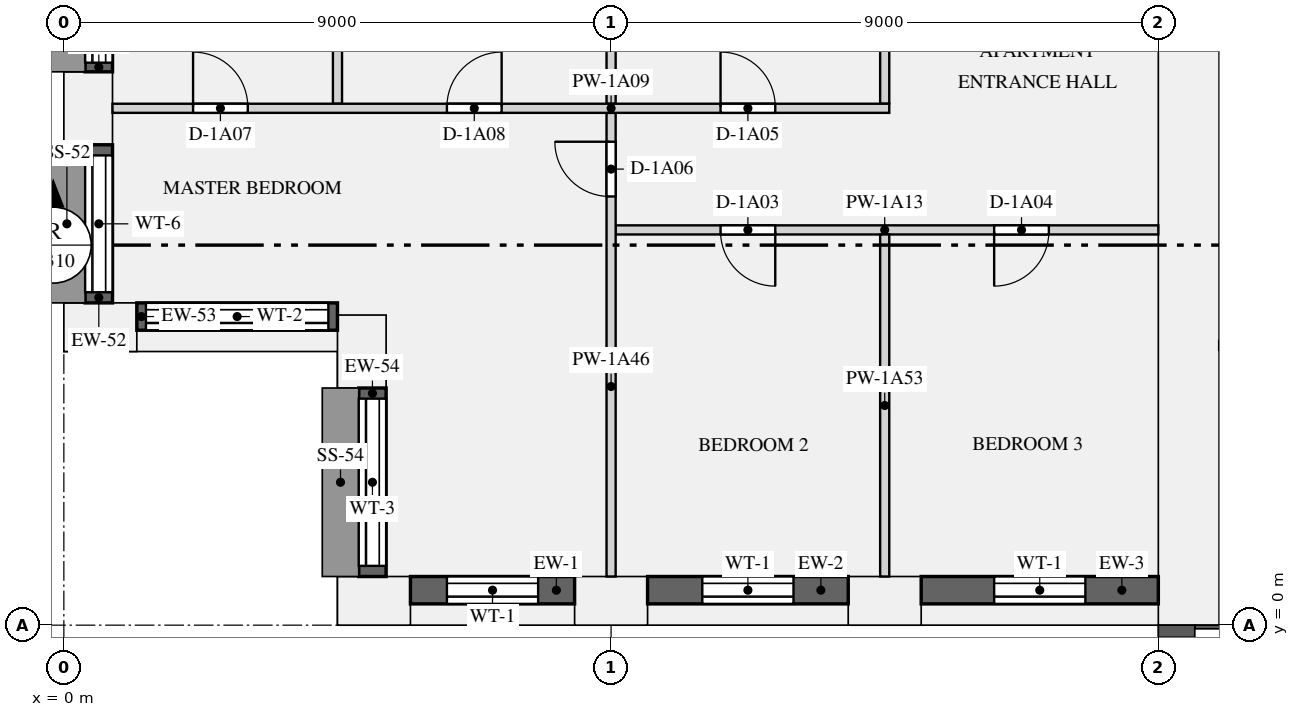
"""IFC4 building model, lengths in metres.
Left out: names, types, materials, properties, quantities, classifications, styles, units other than length and angle.
Written with IfcOpenShell. Run it as: python <this file> out.ifc"""

import sys

from ifc_helpers import new_model, si_unit, direction, frame, frame_2d, origin, origin_2d, place, context, subcontext, project, spatial, rectangle, extrude, element, fill, save


model = new_model("IFC4")
c1 = context("Model", 3, precision=1e-05, world=origin(), true_north=direction((0.0, 1.0)))
c2 = subcontext(c1, "Body", "Model", "MODEL_VIEW")
j1 = project(units=[si_unit("LENGTHUNIT", "METRE"), si_unit("PLANEANGLEUNIT", "RADIAN")], contexts=[c1])
p1 = place(None, origin())
s1 = spatial("IfcSite", under=j1, at=p1, CompositionType="ELEMENT")
p2 = place(p1, origin())
s2 = spatial("IfcBuilding", under=s1, at=p2, CompositionType="ELEMENT")
p3 = place(p2, frame((0.0, 0.0, 19.5)))
s3 = spatial("IfcBuildingStorey", under=s2, at=p3, CompositionType="ELEMENT", Elevation=19.5)
for number, where, z_axis, x_axis in (
    (1, (5.1, 0.4, 0.0), (0.0, 0.0, 1.0), (1.0, 0.0, 0.0)),
    (2, (9.0, 0.4, 0.0), (0.0, 0.0, 1.0), (1.0, 0.0, 0.0)),
):
    element("IfcColumn", number, at=place(p3, frame(where, z_axis=z_axis, x_axis=x_axis)), inside=s3, PredefinedType="USERDEFINED", context=c2, shape_type="SweptSolid", body=[
        extrude(rectangle(XDim=1.2, YDim=0.8, at=origin_2d()), origin(), (0.0, 0.0, 1.0), 3.15),
    ])
for number, where, z_axis, x_axis in (
    (3, (13.5, 0.4, -0.32), (0.0, 0.0, 1.0), (1.0, 0.0, 0.0)),
    (4, (0.4, 8.5, -0.32), (0.0, 0.0, 1.0), (0.0, -1.0, 0.0)),
):
    element("IfcColumn", number, at=place(p3, frame(where, z_axis=z_axis, x_axis=x_axis)), inside=s3, PredefinedType="USERDEFINED", context=c2, shape_type="SweptSolid", body=[
        extrude(rectangle(XDim=1.2, YDim=0.8, at=origin_2d()), origin(), (0.0, 0.0, 1.0), 3.47),
    ])
for number, where, z_axis, x_axis in (
    (5, (0.6, 4.9, 0.0), (0.0, 0.0, 1.0), (1.0, 0.0, 0.0)),
    (6, (4.9, 4.5, 0.0), (0.0, 0.0, 1.0), (0.0, -1.0, 0.0)),
):
    element("IfcColumn", number, at=place(p3, frame(where, z_axis=z_axis, x_axis=x_axis)), inside=s3, PredefinedType="USERDEFINED", context=c2, shape_type="SweptSolid", body=[
        extrude(rectangle(XDim=1.2, YDim=0.8, at=origin_2d()), origin(), (0.0, 0.0, 1.0), 3.15),
    ])
p4 = place(p3, frame((18.5, 0.0, 0.0), z_axis=(0.0, 0.0, 1.0), x_axis=(0.0, 1.0, 0.0)))
e7 = element("IfcWall", 7, at=p4, inside=s3, PredefinedType="SHEAR", context=c2, shape_type="SweptSolid", body=[
    extrude(rectangle(XDim=12.5, YDim=1.0, at=frame_2d((6.25, 0.0))), origin(), (0.0, 0.0, 1.0), 3.15),
])
p5 = place(p3, frame((5.7, 0.575, 0.9), z_axis=(0.0, 0.0, 1.0), x_axis=(1.0, 0.0, 0.0)))
e8 = element("IfcWall", 8, at=p5, inside=s3, PredefinedType="SOLIDWALL", context=c2, shape_type="SweptSolid", body=[
    extrude(rectangle(XDim=2.7, YDim=0.45, at=frame_2d((1.35, 0.0))), origin(), (0.0, 0.0, 1.0), 1.93),
])
p6 = place(p5, frame((0.6, 0.0, 0.15)))
e9 = element("IfcOpeningElement", 9, at=p6, cuts=e8, PredefinedType="OPENING", context=c2, shape_type="SweptSolid", body=[
    extrude(rectangle(XDim=1.5, YDim=1.5, at=frame_2d((0.75, 0.75))), frame((0.0, 0.235, 0.0), z_axis=(0.0, -1.0, 0.0), x_axis=(1.0, 0.0, 0.0)), (0.0, 0.0, 1.0), 0.47),
])
p7 = place(p3, frame((9.6, 0.575, 0.9), z_axis=(0.0, 0.0, 1.0), x_axis=(1.0, 0.0, 0.0)))
e10 = element("IfcWall", 10, at=p7, inside=s3, PredefinedType="SOLIDWALL", context=c2, shape_type="SweptSolid", body=[
    extrude(rectangle(XDim=3.3, YDim=0.45, at=frame_2d((1.65, 0.0))), origin(), (0.0, 0.0, 1.0), 1.93),
])
p8 = place(p7, frame((0.9, 0.0, 0.15)))
e11 = element("IfcOpeningElement", 11, at=p8, cuts=e10, PredefinedType="OPENING", context=c2, shape_type="SweptSolid", body=[
    extrude(rectangle(XDim=1.5, YDim=1.5, at=frame_2d((0.75, 0.75))), frame((0.0, 0.235, 0.0), z_axis=(0.0, -1.0, 0.0), x_axis=(1.0, 0.0, 0.0)), (0.0, 0.0, 1.0), 0.47),
])
p9 = place(p3, frame((14.1, 0.575, 0.9), z_axis=(0.0, 0.0, 1.0), x_axis=(1.0, 0.0, 0.0)))
e12 = element("IfcWall", 12, at=p9, inside=s3, PredefinedType="SOLIDWALL", context=c2, shape_type="SweptSolid", body=[
    extrude(rectangle(XDim=3.9, YDim=0.45, at=frame_2d((1.95, 0.0))), origin(), (0.0, 0.0, 1.0), 1.93),
])
p10 = place(p9, frame((1.2, 0.0, 0.15)))
e13 = element("IfcOpeningElement", 13, at=p10, cuts=e12, PredefinedType="OPENING", context=c2, shape_type="SweptSolid", body=[
    extrude(rectangle(XDim=1.5, YDim=1.5, at=frame_2d((0.75, 0.75))), frame((0.0, 0.235, 0.0), z_axis=(0.0, -1.0, 0.0), x_axis=(1.0, 0.0, 0.0)), (0.0, 0.0, 1.0), 0.47),
])
p11 = place(p3, frame((0.575, 11.9, 0.9), z_axis=(0.0, 0.0, 1.0), x_axis=(0.0, -1.0, 0.0)))
e14 = element("IfcWall", 14, at=p11, inside=s3, PredefinedType="SOLIDWALL", context=c2, shape_type="SweptSolid", body=[
    extrude(rectangle(XDim=2.8, YDim=0.45, at=frame_2d((1.4, 0.0))), origin(), (0.0, 0.0, 1.0), 1.93),
])
p12 = place(p11, frame((0.15, 0.0, 0.15)))
e15 = element("IfcOpeningElement", 15, at=p12, cuts=e14, PredefinedType="OPENING", context=c2, shape_type="SweptSolid", body=[
    extrude(rectangle(XDim=2.5, YDim=1.5, at=frame_2d((1.25, 0.75))), frame((0.0, 0.235, 0.0), z_axis=(0.0, -1.0, 0.0), x_axis=(1.0, 0.0, 0.0)), (0.0, 0.0, 1.0), 0.47),
])
p13 = place(p3, frame((0.575, 7.9, 0.9), z_axis=(0.0, 0.0, 1.0), x_axis=(0.0, -1.0, 0.0)))
e16 = element("IfcWall", 16, at=p13, inside=s3, PredefinedType="SOLIDWALL", context=c2, shape_type="SweptSolid", body=[
    extrude(rectangle(XDim=2.6, YDim=0.45, at=frame_2d((1.3, 0.0))), origin(), (0.0, 0.0, 1.0), 1.93),
])
p14 = place(p13, frame((0.175, 0.0, 0.15)))
e17 = element("IfcOpeningElement", 17, at=p14, cuts=e16, PredefinedType="OPENING", context=c2, shape_type="SweptSolid", body=[
    extrude(rectangle(XDim=2.25, YDim=1.5, at=frame_2d((1.125, 0.75))), frame((0.0, 0.235, 0.0), z_axis=(0.0, -1.0, 0.0), x_axis=(1.0, 0.0, 0.0)), (0.0, 0.0, 1.0), 0.47),
])
p15 = place(p3, frame((1.2, 5.075, 0.9), z_axis=(0.0, 0.0, 1.0), x_axis=(1.0, 0.0, 0.0)))
e18 = element("IfcWall", 18, at=p15, inside=s3, PredefinedType="SOLIDWALL", context=c2, shape_type="SweptSolid", body=[
    extrude(rectangle(XDim=3.3, YDim=0.45, at=frame_2d((1.65, 0.0))), origin(), (0.0, 0.0, 1.0), 1.93),
])
p16 = place(p15, frame((0.15, 0.0, 0.15)))
e19 = element("IfcOpeningElement", 19, at=p16, cuts=e18, PredefinedType="OPENING", context=c2, shape_type="SweptSolid", body=[
    extrude(rectangle(XDim=3.0, YDim=1.5, at=frame_2d((1.5, 0.75))), frame((0.0, 0.235, 0.0), z_axis=(0.0, -1.0, 0.0), x_axis=(1.0, 0.0, 0.0)), (0.0, 0.0, 1.0), 0.47),
])
p17 = place(p3, frame((5.075, 3.9, 0.9), z_axis=(0.0, 0.0, 1.0), x_axis=(0.0, -1.0, 0.0)))
e20 = element("IfcWall", 20, at=p17, inside=s3, PredefinedType="SOLIDWALL", context=c2, shape_type="SweptSolid", body=[
    extrude(rectangle(XDim=3.1, YDim=0.45, at=frame_2d((1.55, 0.0))), origin(), (0.0, 0.0, 1.0), 1.93),
])
p18 = place(p17, frame((0.175, 0.0, 0.15)))
e21 = element("IfcOpeningElement", 21, at=p18, cuts=e20, PredefinedType="OPENING", context=c2, shape_type="SweptSolid", body=[
    extrude(rectangle(XDim=2.75, YDim=1.5, at=frame_2d((1.375, 0.75))), frame((0.0, 0.235, 0.0), z_axis=(0.0, -1.0, 0.0), x_axis=(1.0, 0.0, 0.0)), (0.0, 0.0, 1.0), 0.47),
])
p19 = place(p3, frame((19.0, 4.6, 0.0), z_axis=(0.0, 0.0, 1.0), x_axis=(1.0, 0.0, 0.0)))
e22 = element("IfcWall", 22, at=p19, inside=s3, PredefinedType="PARTITIONING", context=c2, shape_type="SweptSolid", body=[
    extrude(rectangle(XDim=8.3, YDim=0.15, at=frame_2d((4.15, 0.0))), origin(), (0.0, 0.0, 1.0), 2.83),
])
p20 = place(p19, frame((0.45, 0.0, 0.0)))
e23 = element("IfcOpeningElement", 23, at=p20, cuts=e22, PredefinedType="OPENING", context=c2, shape_type="SweptSolid", body=[
    extrude(rectangle(XDim=0.9, YDim=2.1, at=frame_2d((0.45, 1.05))), frame((0.0, 0.085, 0.0), z_axis=(0.0, -1.0, 0.0), x_axis=(1.0, 0.0, 0.0)), (0.0, 0.0, 1.0), 0.17),
])
p21 = place(p19, frame((4.65, 0.0, 0.0)))
e24 = element("IfcOpeningElement", 24, at=p21, cuts=e22, PredefinedType="OPENING", context=c2, shape_type="SweptSolid", body=[
    extrude(rectangle(XDim=0.9, YDim=2.1, at=frame_2d((0.45, 1.05))), frame((0.0, 0.085, 0.0), z_axis=(0.0, -1.0, 0.0), x_axis=(1.0, 0.0, 0.0)), (0.0, 0.0, 1.0), 0.17),
])
p22 = place(p3, frame((0.8, 8.5, 0.0), z_axis=(0.0, 0.0, 1.0), x_axis=(1.0, 0.0, 0.0)))
e25 = element("IfcWall", 25, at=p22, inside=s3, PredefinedType="PARTITIONING", context=c2, shape_type="SweptSolid", body=[
    extrude(rectangle(XDim=12.775, YDim=0.15, at=frame_2d((6.387, 0.0))), origin(), (0.0, 0.0, 1.0), 2.83),
])
p23 = place(p22, frame((10.0, 0.0, 0.0)))
e26 = element("IfcOpeningElement", 26, at=p23, cuts=e25, PredefinedType="OPENING", context=c2, shape_type="SweptSolid", body=[
    extrude(rectangle(XDim=0.9, YDim=2.1, at=frame_2d((0.45, 1.05))), frame((0.0, 0.085, 0.0), z_axis=(0.0, -1.0, 0.0), x_axis=(1.0, 0.0, 0.0)), (0.0, 0.0, 1.0), 0.17),
])
p24 = place(p22, frame((1.325, 0.0, 0.0)))
e27 = element("IfcOpeningElement", 27, at=p24, cuts=e25, PredefinedType="OPENING", context=c2, shape_type="SweptSolid", body=[
    extrude(rectangle(XDim=0.9, YDim=2.1, at=frame_2d((0.45, 1.05))), frame((0.0, 0.085, 0.0), z_axis=(0.0, -1.0, 0.0), x_axis=(1.0, 0.0, 0.0)), (0.0, 0.0, 1.0), 0.17),
])
p25 = place(p22, frame((5.5, 0.0, 0.0)))
e28 = element("IfcOpeningElement", 28, at=p25, cuts=e25, PredefinedType="OPENING", context=c2, shape_type="SweptSolid", body=[
    extrude(rectangle(XDim=0.9, YDim=2.1, at=frame_2d((0.45, 1.05))), frame((0.0, 0.085, 0.0), z_axis=(0.0, -1.0, 0.0), x_axis=(1.0, 0.0, 0.0)), (0.0, 0.0, 1.0), 0.17),
])
p26 = place(p3, frame((9.075, 6.5, 0.0), z_axis=(0.0, 0.0, 1.0), x_axis=(1.0, 0.0, 0.0)))
e29 = element("IfcWall", 29, at=p26, inside=s3, PredefinedType="PARTITIONING", context=c2, shape_type="SweptSolid", body=[
    extrude(rectangle(XDim=8.925, YDim=0.15, at=frame_2d((4.462, 0.0))), origin(), (0.0, 0.0, 1.0), 2.83),
])
p27 = place(p26, frame((1.725, 0.0, 0.0)))
e30 = element("IfcOpeningElement", 30, at=p27, cuts=e29, PredefinedType="OPENING", context=c2, shape_type="SweptSolid", body=[
    extrude(rectangle(XDim=0.9, YDim=2.1, at=frame_2d((0.45, 1.05))), frame((0.0, 0.085, 0.0), z_axis=(0.0, -1.0, 0.0), x_axis=(1.0, 0.0, 0.0)), (0.0, 0.0, 1.0), 0.17),
])
p28 = place(p26, frame((6.225, 0.0, 0.0)))
e31 = element("IfcOpeningElement", 31, at=p28, cuts=e29, PredefinedType="OPENING", context=c2, shape_type="SweptSolid", body=[
    extrude(rectangle(XDim=0.9, YDim=2.1, at=frame_2d((0.45, 1.05))), frame((0.0, 0.085, 0.0), z_axis=(0.0, -1.0, 0.0), x_axis=(1.0, 0.0, 0.0)), (0.0, 0.0, 1.0), 0.17),
])
p29 = place(p3, frame((9.0, 0.8, 0.0), z_axis=(0.0, 0.0, 1.0), x_axis=(0.0, 1.0, 0.0)))
e32 = element("IfcWall", 32, at=p29, inside=s3, PredefinedType="PARTITIONING", context=c2, shape_type="SweptSolid", body=[
    extrude(rectangle(XDim=7.625, YDim=0.15, at=frame_2d((3.812, 0.0))), origin(), (0.0, 0.0, 1.0), 2.83),
])
p30 = place(p29, frame((6.25, 0.0, 0.0)))
e33 = element("IfcOpeningElement", 33, at=p30, cuts=e32, PredefinedType="OPENING", context=c2, shape_type="SweptSolid", body=[
    extrude(rectangle(XDim=0.9, YDim=2.1, at=frame_2d((0.45, 1.05))), frame((0.0, 0.085, 0.0), z_axis=(0.0, -1.0, 0.0), x_axis=(1.0, 0.0, 0.0)), (0.0, 0.0, 1.0), 0.17),
])
for number, where, z_axis, x_axis in (
    (34, (9.0, 8.575, 0.0), (0.0, 0.0, 1.0), (0.0, 1.0, 0.0)),
    (35, (4.5, 8.575, 0.0), (0.0, 0.0, 1.0), (0.0, 1.0, 0.0)),
):
    element("IfcWall", number, at=place(p3, frame(where, z_axis=z_axis, x_axis=x_axis)), inside=s3, PredefinedType="PARTITIONING", context=c2, shape_type="SweptSolid", body=[
        extrude(rectangle(XDim=3.85, YDim=0.15, at=frame_2d((1.925, 0.0))), origin(), (0.0, 0.0, 1.0), 2.83),
    ])
p31 = place(p3, frame((13.5, 0.8, 0.0), z_axis=(0.0, 0.0, 1.0), x_axis=(0.0, 1.0, 0.0)))
e36 = element("IfcWall", 36, at=p31, inside=s3, PredefinedType="PARTITIONING", context=c2, shape_type="SweptSolid", body=[
    extrude(rectangle(XDim=5.625, YDim=0.15, at=frame_2d((2.812, 0.0))), origin(), (0.0, 0.0, 1.0), 2.83),
])
p32 = place(p3, frame((13.5, 8.575, 0.0), z_axis=(0.0, 0.0, 1.0), x_axis=(0.0, 1.0, 0.0)))
e37 = element("IfcWall", 37, at=p32, inside=s3, PredefinedType="PARTITIONING", context=c2, shape_type="SweptSolid", body=[
    extrude(rectangle(XDim=11.85, YDim=0.15, at=frame_2d((5.925, 0.0))), origin(), (0.0, 0.0, 1.0), 2.83),
])
p33 = place(p32, frame((7.475, 0.0, 0.0)))
e38 = element("IfcOpeningElement", 38, at=p33, cuts=e37, PredefinedType="OPENING", context=c2, shape_type="SweptSolid", body=[
    extrude(rectangle(XDim=0.9, YDim=2.1, at=frame_2d((0.45, 1.05))), frame((0.0, 0.085, 0.0), z_axis=(0.0, -1.0, 0.0), x_axis=(1.0, 0.0, 0.0)), (0.0, 0.0, 1.0), 0.17),
])
p34 = place(p6, origin())
e39 = element("IfcWindow", 39, at=p34, inside=s3, PartitioningType="SINGLE_PANEL", PredefinedType="WINDOW", context=c2, shape_type="SweptSolid", body=[
    extrude(rectangle(XDim=1.5, YDim=1.5, at=frame_2d((0.75, 0.75))), frame((0.0, -0.065, 0.0), z_axis=(0.0, -1.0, 0.0), x_axis=(1.0, 0.0, 0.0)), (0.0, 0.0, 1.0), 0.06),
])
fill(e9, e39)
p35 = place(p8, origin())
e40 = element("IfcWindow", 40, at=p35, inside=s3, PartitioningType="SINGLE_PANEL", PredefinedType="WINDOW", context=c2, shape_type="SweptSolid", body=[
    extrude(rectangle(XDim=1.5, YDim=1.5, at=frame_2d((0.75, 0.75))), frame((0.0, -0.065, 0.0), z_axis=(0.0, -1.0, 0.0), x_axis=(1.0, 0.0, 0.0)), (0.0, 0.0, 1.0), 0.06),
])
fill(e11, e40)
p36 = place(p10, origin())
e41 = element("IfcWindow", 41, at=p36, inside=s3, PartitioningType="SINGLE_PANEL", PredefinedType="WINDOW", context=c2, shape_type="SweptSolid", body=[
    extrude(rectangle(XDim=1.5, YDim=1.5, at=frame_2d((0.75, 0.75))), frame((0.0, -0.065, 0.0), z_axis=(0.0, -1.0, 0.0), x_axis=(1.0, 0.0, 0.0)), (0.0, 0.0, 1.0), 0.06),
])
fill(e13, e41)
p37 = place(p12, origin())
e42 = element("IfcWindow", 42, at=p37, inside=s3, PartitioningType="SINGLE_PANEL", PredefinedType="WINDOW", context=c2, shape_type="SweptSolid", body=[
    extrude(rectangle(XDim=2.5, YDim=1.5, at=frame_2d((1.25, 0.75))), frame((0.0, -0.065, 0.0), z_axis=(0.0, -1.0, 0.0), x_axis=(1.0, 0.0, 0.0)), (0.0, 0.0, 1.0), 0.06),
])
fill(e15, e42)
p38 = place(p14, origin())
e43 = element("IfcWindow", 43, at=p38, inside=s3, PartitioningType="SINGLE_PANEL", PredefinedType="WINDOW", context=c2, shape_type="SweptSolid", body=[
    extrude(rectangle(XDim=2.25, YDim=1.5, at=frame_2d((1.125, 0.75))), frame((0.0, -0.065, 0.0), z_axis=(0.0, -1.0, 0.0), x_axis=(1.0, 0.0, 0.0)), (0.0, 0.0, 1.0), 0.06),
])
fill(e17, e43)
p39 = place(p16, origin())
e44 = element("IfcWindow", 44, at=p39, inside=s3, PartitioningType="SINGLE_PANEL", PredefinedType="WINDOW", context=c2, shape_type="SweptSolid", body=[
    extrude(rectangle(XDim=3.0, YDim=1.5, at=frame_2d((1.5, 0.75))), frame((0.0, -0.065, 0.0), z_axis=(0.0, -1.0, 0.0), x_axis=(1.0, 0.0, 0.0)), (0.0, 0.0, 1.0), 0.06),
])
fill(e19, e44)
p40 = place(p18, origin())
e45 = element("IfcWindow", 45, at=p40, inside=s3, PartitioningType="SINGLE_PANEL", PredefinedType="WINDOW", context=c2, shape_type="SweptSolid", body=[
    extrude(rectangle(XDim=2.75, YDim=1.5, at=frame_2d((1.375, 0.75))), frame((0.0, -0.065, 0.0), z_axis=(0.0, -1.0, 0.0), x_axis=(1.0, 0.0, 0.0)), (0.0, 0.0, 1.0), 0.06),
])
fill(e21, e45)
p41 = place(p27, frame((0.9, 0.0, 0.0), z_axis=(0.0, 0.0, 1.0), x_axis=(-1.0, 0.0, 0.0)))
e46 = element("IfcDoor", 46, at=p41, inside=s3, OperationType="SINGLE_SWING_LEFT", PredefinedType="DOOR", context=c2, shape_type="SweptSolid", body=[
    extrude(rectangle(XDim=0.9, YDim=2.1, at=frame_2d((0.45, 1.05))), frame((0.0, 0.025, 0.0), z_axis=(0.0, -1.0, 0.0), x_axis=(1.0, 0.0, 0.0)), (0.0, 0.0, 1.0), 0.05),
])
fill(e30, e46)
p42 = place(p28, frame((0.9, 0.0, 0.0), z_axis=(0.0, 0.0, 1.0), x_axis=(-1.0, 0.0, 0.0)))
e47 = element("IfcDoor", 47, at=p42, inside=s3, OperationType="SINGLE_SWING_RIGHT", PredefinedType="DOOR", context=c2, shape_type="SweptSolid", body=[
    extrude(rectangle(XDim=0.9, YDim=2.1, at=frame_2d((0.45, 1.05))), frame((0.0, 0.025, 0.0), z_axis=(0.0, -1.0, 0.0), x_axis=(1.0, 0.0, 0.0)), (0.0, 0.0, 1.0), 0.05),
])
fill(e31, e47)
p43 = place(p23, origin())
e48 = element("IfcDoor", 48, at=p43, inside=s3, OperationType="SINGLE_SWING_LEFT", PredefinedType="DOOR", context=c2, shape_type="SweptSolid", body=[
    extrude(rectangle(XDim=0.9, YDim=2.1, at=frame_2d((0.45, 1.05))), frame((0.0, 0.025, 0.0), z_axis=(0.0, -1.0, 0.0), x_axis=(1.0, 0.0, 0.0)), (0.0, 0.0, 1.0), 0.05),
])
fill(e26, e48)
p44 = place(p30, origin())
e49 = element("IfcDoor", 49, at=p44, inside=s3, OperationType="SINGLE_SWING_RIGHT", PredefinedType="DOOR", context=c2, shape_type="SweptSolid", body=[
    extrude(rectangle(XDim=0.9, YDim=2.1, at=frame_2d((0.45, 1.05))), frame((0.0, 0.025, 0.0), z_axis=(0.0, -1.0, 0.0), x_axis=(1.0, 0.0, 0.0)), (0.0, 0.0, 1.0), 0.05),
])
fill(e33, e49)
p45 = place(p24, origin())
e50 = element("IfcDoor", 50, at=p45, inside=s3, OperationType="SINGLE_SWING_LEFT", PredefinedType="DOOR", context=c2, shape_type="SweptSolid", body=[
    extrude(rectangle(XDim=0.9, YDim=2.1, at=frame_2d((0.45, 1.05))), frame((0.0, 0.025, 0.0), z_axis=(0.0, -1.0, 0.0), x_axis=(1.0, 0.0, 0.0)), (0.0, 0.0, 1.0), 0.05),
])
fill(e27, e50)
p46 = place(p25, origin())
e51 = element("IfcDoor", 51, at=p46, inside=s3, OperationType="SINGLE_SWING_RIGHT", PredefinedType="DOOR", context=c2, shape_type="SweptSolid", body=[
    extrude(rectangle(XDim=0.9, YDim=2.1, at=frame_2d((0.45, 1.05))), frame((0.0, 0.025, 0.0), z_axis=(0.0, -1.0, 0.0), x_axis=(1.0, 0.0, 0.0)), (0.0, 0.0, 1.0), 0.05),
])
fill(e28, e51)
save(model, sys.argv[1])
